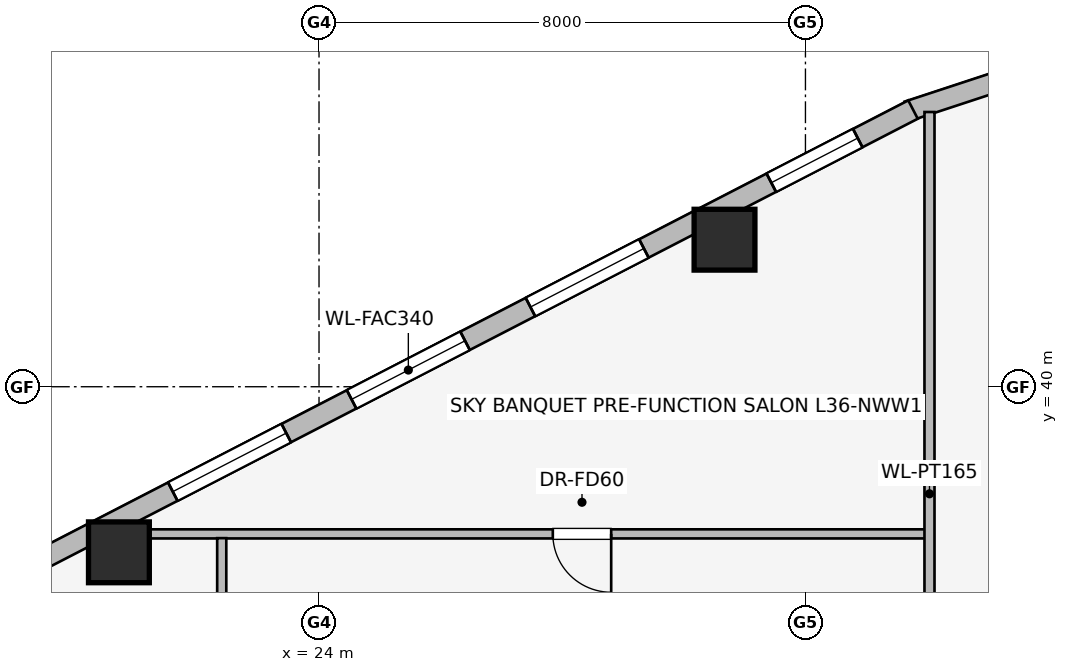
"""IFC4 building model, lengths in metres.
Left out: names, types, materials, properties, quantities, classifications, styles, units other than length and angle.
Written with IfcOpenShell. Run it as: python <this file> out.ifc"""

import sys

from ifc_helpers import new_model, si_unit, direction, frame, frame_2d, origin, origin_2d, place, context, subcontext, project, spatial, rectangle, extrude, element, fill, save


model = new_model("IFC4")
c1 = context("Model", 3, precision=1e-05, world=origin(), true_north=direction((0.0, 1.0)))
c2 = subcontext(c1, "Body", "Model", "MODEL_VIEW")
j1 = project(units=[si_unit("LENGTHUNIT", "METRE"), si_unit("PLANEANGLEUNIT", "RADIAN")], contexts=[c1])
p1 = place(None, origin())
s1 = spatial("IfcSite", under=j1, at=p1, CompositionType="ELEMENT")
p2 = place(p1, origin())
s2 = spatial("IfcBuilding", under=s1, at=p2, CompositionType="ELEMENT")
p3 = place(p2, frame((0.0, 0.0, 136.05)))
s3 = spatial("IfcBuildingStorey", under=s2, at=p3, CompositionType="ELEMENT", Elevation=136.05)
for number, where, z_axis, x_axis in (
    (1, (30.669, 42.418, 0.0), (0.0, 0.0, 1.0), (1.0, 0.0, 0.0)),
    (2, (20.709, 37.277, 0.0), (0.0, 0.0, 1.0), (1.0, 0.0, 0.0)),
):
    element("IfcColumn", number, at=place(p3, frame(where, z_axis=z_axis, x_axis=x_axis)), inside=s3, PredefinedType="COLUMN", context=c2, shape_type="SweptSolid", body=[
        extrude(rectangle(XDim=1.0, YDim=1.0, at=origin_2d()), origin(), (0.0, 0.0, 1.0), 3.45),
    ])
p4 = place(p3, frame((33.681, 44.532, 0.0), z_axis=(0.0, 0.0, 1.0), x_axis=(0.949937416267, 0.312440242569, 0.0)))
e3 = element("IfcWall", 3, at=p4, inside=s3, PredefinedType="STANDARD", context=c2, shape_type="SweptSolid", body=[
    extrude(rectangle(XDim=1.722, YDim=0.33, at=frame_2d((0.861, 0.0))), origin(), (0.0, 0.0, 1.0), 3.16),
])
p5 = place(p3, frame((17.169, 35.99, 0.0), z_axis=(0.0, 0.0, 1.0), x_axis=(0.888613612362, 0.458656568606, 0.0)))
e4 = element("IfcWall", 4, at=p5, inside=s3, PredefinedType="STANDARD", context=c2, shape_type="SweptSolid", body=[
    extrude(rectangle(XDim=18.681, YDim=0.34, at=frame_2d((9.34, 0.0))), origin(), (0.0, 0.0, 1.0), 3.16),
])
p6 = place(p5, frame((1.023, 0.0, 0.75)))
e5 = element("IfcOpeningElement", 5, at=p6, cuts=e4, PredefinedType="OPENING", context=c2, shape_type="SweptSolid", body=[
    extrude(rectangle(XDim=1.6, YDim=1.55, at=frame_2d((0.8, 0.775))), frame((0.0, 0.18, 0.0), z_axis=(0.0, -1.0, 0.0), x_axis=(1.0, 0.0, 0.0)), (0.0, 0.0, 1.0), 0.36),
])
p7 = place(p5, frame((4.981, 0.0, 0.75)))
e6 = element("IfcOpeningElement", 6, at=p7, cuts=e4, PredefinedType="OPENING", context=c2, shape_type="SweptSolid", body=[
    extrude(rectangle(XDim=2.1, YDim=1.5, at=frame_2d((1.05, 0.75))), frame((0.0, 0.18, 0.0), z_axis=(0.0, -1.0, 0.0), x_axis=(1.0, 0.0, 0.0)), (0.0, 0.0, 1.0), 0.36),
])
p8 = place(p5, frame((8.29, 0.0, 0.75)))
e7 = element("IfcOpeningElement", 7, at=p8, cuts=e4, PredefinedType="OPENING", context=c2, shape_type="SweptSolid", body=[
    extrude(rectangle(XDim=2.1, YDim=1.5, at=frame_2d((1.05, 0.75))), frame((0.0, 0.18, 0.0), z_axis=(0.0, -1.0, 0.0), x_axis=(1.0, 0.0, 0.0)), (0.0, 0.0, 1.0), 0.36),
])
p9 = place(p5, frame((11.6, 0.0, 0.75)))
e8 = element("IfcOpeningElement", 8, at=p9, cuts=e4, PredefinedType="OPENING", context=c2, shape_type="SweptSolid", body=[
    extrude(rectangle(XDim=2.1, YDim=1.5, at=frame_2d((1.05, 0.75))), frame((0.0, 0.18, 0.0), z_axis=(0.0, -1.0, 0.0), x_axis=(1.0, 0.0, 0.0)), (0.0, 0.0, 1.0), 0.36),
])
p10 = place(p5, frame((16.058, 0.0, 0.75)))
e9 = element("IfcOpeningElement", 9, at=p10, cuts=e4, PredefinedType="OPENING", context=c2, shape_type="SweptSolid", body=[
    extrude(rectangle(XDim=1.6, YDim=1.55, at=frame_2d((0.8, 0.775))), frame((0.0, 0.18, 0.0), z_axis=(0.0, -1.0, 0.0), x_axis=(1.0, 0.0, 0.0)), (0.0, 0.0, 1.0), 0.36),
])
p11 = place(p3, frame((34.0, 37.58, 0.0), z_axis=(0.0, 0.0, 1.0), x_axis=(-1.0, 0.0, 0.0)))
e10 = element("IfcWall", 10, at=p11, inside=s3, PredefinedType="PARTITIONING", context=c2, shape_type="SweptSolid", body=[
    extrude(rectangle(XDim=13.707, YDim=0.15, at=frame_2d((6.854, 0.0))), origin(), (0.0, 0.0, 1.0), 3.16),
])
p12 = place(p11, frame((5.195, 0.0, 0.0)))
e11 = element("IfcOpeningElement", 11, at=p12, cuts=e10, PredefinedType="OPENING", context=c2, shape_type="SweptSolid", body=[
    extrude(rectangle(XDim=0.96, YDim=2.0, at=frame_2d((0.48, 1.0))), frame((0.0, 0.085, 0.0), z_axis=(0.0, -1.0, 0.0), x_axis=(1.0, 0.0, 0.0)), (0.0, 0.0, 1.0), 0.17),
])
p13 = place(p3, frame((34.04, 31.96, 0.0), z_axis=(0.0, 0.0, 1.0), x_axis=(0.0, 1.0, 0.0)))
e12 = element("IfcWall", 12, at=p13, inside=s3, PredefinedType="PARTITIONING", context=c2, shape_type="SweptSolid", body=[
    extrude(rectangle(XDim=12.558, YDim=0.165, at=frame_2d((6.279, 0.0))), origin(), (0.0, 0.0, 1.0), 3.16),
])
p14 = place(p3, frame((22.4, 36.08, 0.0), z_axis=(0.0, 0.0, 1.0), x_axis=(0.0, 1.0, 0.0)))
e13 = element("IfcWall", 13, at=p14, inside=s3, PredefinedType="PARTITIONING", context=c2, shape_type="SweptSolid", body=[
    extrude(rectangle(XDim=1.43, YDim=0.15, at=frame_2d((0.715, 0.0))), origin(), (0.0, 0.0, 1.0), 3.16),
])
p15 = place(p7, origin())
e14 = element("IfcWindow", 14, at=p15, inside=s3, PartitioningType="SINGLE_PANEL", PredefinedType="WINDOW", context=c2, shape_type="SweptSolid", body=[
    extrude(rectangle(XDim=2.1, YDim=1.5, at=frame_2d((1.05, 0.75))), frame((0.0, 0.03, 0.0), z_axis=(0.0, -1.0, 0.0), x_axis=(1.0, 0.0, 0.0)), (0.0, 0.0, 1.0), 0.06),
])
fill(e6, e14)
p16 = place(p8, origin())
e15 = element("IfcWindow", 15, at=p16, inside=s3, PartitioningType="SINGLE_PANEL", PredefinedType="WINDOW", context=c2, shape_type="SweptSolid", body=[
    extrude(rectangle(XDim=2.1, YDim=1.5, at=frame_2d((1.05, 0.75))), frame((0.0, 0.03, 0.0), z_axis=(0.0, -1.0, 0.0), x_axis=(1.0, 0.0, 0.0)), (0.0, 0.0, 1.0), 0.06),
])
fill(e7, e15)
p17 = place(p9, origin())
e16 = element("IfcWindow", 16, at=p17, inside=s3, PartitioningType="SINGLE_PANEL", PredefinedType="WINDOW", context=c2, shape_type="SweptSolid", body=[
    extrude(rectangle(XDim=2.1, YDim=1.5, at=frame_2d((1.05, 0.75))), frame((0.0, 0.03, 0.0), z_axis=(0.0, -1.0, 0.0), x_axis=(1.0, 0.0, 0.0)), (0.0, 0.0, 1.0), 0.06),
])
fill(e8, e16)
p18 = place(p10, origin())
e17 = element("IfcWindow", 17, at=p18, inside=s3, PartitioningType="SINGLE_PANEL", PredefinedType="WINDOW", context=c2, shape_type="SweptSolid", body=[
    extrude(rectangle(XDim=1.6, YDim=1.55, at=frame_2d((0.8, 0.775))), frame((0.0, 0.03, 0.0), z_axis=(0.0, -1.0, 0.0), x_axis=(1.0, 0.0, 0.0)), (0.0, 0.0, 1.0), 0.06),
])
fill(e9, e17)
p19 = place(p12, origin())
e18 = element("IfcDoor", 18, at=p19, inside=s3, OperationType="SINGLE_SWING_LEFT", PredefinedType="DOOR", context=c2, shape_type="SweptSolid", body=[
    extrude(rectangle(XDim=0.96, YDim=2.0, at=frame_2d((0.48, 1.0))), frame((0.0, 0.025, 0.0), z_axis=(0.0, -1.0, 0.0), x_axis=(1.0, 0.0, 0.0)), (0.0, 0.0, 1.0), 0.05),
])
fill(e11, e18)
save(model, sys.argv[1])
